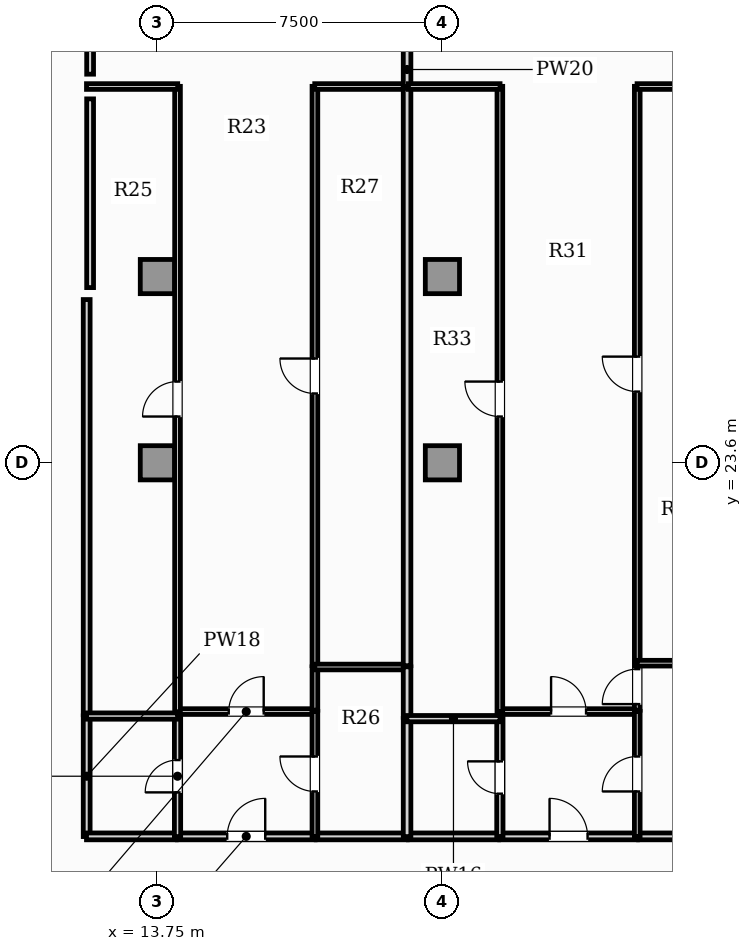
"""IFC4 building model, lengths in metres.
Left out: names, types, materials, properties, quantities, classifications, styles, units other than length and angle.
Written with IfcOpenShell. Run it as: python <this file> out.ifc"""

import sys

from ifc_helpers import new_model, si_unit, direction, frame, frame_2d, origin, origin_2d, place, context, subcontext, project, spatial, rectangle, extrude, element, fill, save


model = new_model("IFC4")
c1 = context("Model", 3, precision=1e-05, world=origin(), true_north=direction((0.0, 1.0)))
c2 = subcontext(c1, "Body", "Model", "MODEL_VIEW")
j1 = project(units=[si_unit("LENGTHUNIT", "METRE"), si_unit("PLANEANGLEUNIT", "RADIAN")], contexts=[c1])
p1 = place(None, origin())
s1 = spatial("IfcSite", under=j1, at=p1, CompositionType="ELEMENT")
p2 = place(p1, origin())
s2 = spatial("IfcBuilding", under=s1, at=p2, CompositionType="ELEMENT")
p3 = place(p2, frame((0.0, 0.0, 92.6)))
s3 = spatial("IfcBuildingStorey", under=s2, at=p3, CompositionType="ELEMENT", Elevation=92.6)
for number, where, z_axis, x_axis in (
    (1, (13.75, 23.6, 0.0), (0.0, 0.0, 1.0), (1.0, 0.0, 0.0)),
    (2, (21.25, 23.6, 0.0), (0.0, 0.0, 1.0), (1.0, 0.0, 0.0)),
    (3, (13.75, 28.5, 0.0), (0.0, 0.0, 1.0), (1.0, 0.0, 0.0)),
    (4, (21.25, 28.5, 0.0), (0.0, 0.0, 1.0), (1.0, 0.0, 0.0)),
):
    element("IfcColumn", number, at=place(p3, frame(where, z_axis=z_axis, x_axis=x_axis)), inside=s3, PredefinedType="COLUMN", context=c2, shape_type="SweptSolid", body=[
        extrude(rectangle(XDim=0.9, YDim=0.9, at=origin_2d()), origin(), (0.0, 0.0, 1.0), 3.85),
    ])
p4 = place(p3, frame((14.275, 13.77, 0.0), z_axis=(0.0, 0.0, 1.0), x_axis=(1.0, 0.0, 0.0)))
e5 = element("IfcWall", 5, at=p4, inside=s3, PredefinedType="PARTITIONING", context=c2, shape_type="SweptSolid", body=[
    extrude(rectangle(XDim=3.625, YDim=0.18, at=frame_2d((1.812, 0.0))), origin(), (0.0, 0.0, 1.0), 3.6),
])
p5 = place(p4, frame((1.312, 0.0, 0.0)))
e6 = element("IfcOpeningElement", 6, at=p5, cuts=e5, PredefinedType="OPENING", context=c2, shape_type="SweptSolid", body=[
    extrude(rectangle(XDim=1.0, YDim=2.15, at=frame_2d((0.5, 1.075))), frame((0.0, 0.1, 0.0), z_axis=(0.0, -1.0, 0.0), x_axis=(1.0, 0.0, 0.0)), (0.0, 0.0, 1.0), 0.2),
])
p6 = place(p3, frame((11.89, 13.765, 0.0), z_axis=(0.0, 0.0, 1.0), x_axis=(0.0, 1.0, 0.0)))
e7 = element("IfcWall", 7, at=p6, inside=s3, PredefinedType="PARTITIONING", context=c2, shape_type="SweptSolid", body=[
    extrude(rectangle(XDim=3.176, YDim=0.18, at=frame_2d((1.588, 0.0))), origin(), (0.0, 0.0, 1.0), 3.6),
])
p7 = place(p3, frame((11.885, 13.77, 0.0), z_axis=(0.0, 0.0, 1.0), x_axis=(1.0, 0.0, 0.0)))
e8 = element("IfcWall", 8, at=p7, inside=s3, PredefinedType="PARTITIONING", context=c2, shape_type="SweptSolid", body=[
    extrude(rectangle(XDim=2.36, YDim=0.18, at=frame_2d((1.18, 0.0))), origin(), (0.0, 0.0, 1.0), 3.6),
])
p8 = place(p3, frame((11.89, 16.971, 0.0), z_axis=(0.0, 0.0, 1.0), x_axis=(0.0, 1.0, 0.0)))
e9 = element("IfcWall", 9, at=p8, inside=s3, PredefinedType="PARTITIONING", context=c2, shape_type="SweptSolid", body=[
    extrude(rectangle(XDim=10.924, YDim=0.18, at=frame_2d((5.462, 0.0))), origin(), (0.0, 0.0, 1.0), 3.6),
])
p9 = place(p3, frame((17.93, 13.77, 0.0), z_axis=(0.0, 0.0, 1.0), x_axis=(1.0, 0.0, 0.0)))
e10 = element("IfcWall", 10, at=p9, inside=s3, PredefinedType="PARTITIONING", context=c2, shape_type="SweptSolid", body=[
    extrude(rectangle(XDim=2.395, YDim=0.18, at=frame_2d((1.197, 0.0))), origin(), (0.0, 0.0, 1.0), 3.6),
])
p10 = place(p3, frame((22.757, 13.77, 0.0), z_axis=(0.0, 0.0, 1.0), x_axis=(1.0, 0.0, 0.0)))
e11 = element("IfcWall", 11, at=p10, inside=s3, PredefinedType="PARTITIONING", context=c2, shape_type="SweptSolid", body=[
    extrude(rectangle(XDim=3.625, YDim=0.18, at=frame_2d((1.812, 0.0))), origin(), (0.0, 0.0, 1.0), 3.6),
])
p11 = place(p10, frame((1.312, 0.0, 0.0)))
e12 = element("IfcOpeningElement", 12, at=p11, cuts=e11, PredefinedType="OPENING", context=c2, shape_type="SweptSolid", body=[
    extrude(rectangle(XDim=1.0, YDim=2.15, at=frame_2d((0.5, 1.075))), frame((0.0, 0.1, 0.0), z_axis=(0.0, -1.0, 0.0), x_axis=(1.0, 0.0, 0.0)), (0.0, 0.0, 1.0), 0.2),
])
p12 = place(p3, frame((20.355, 13.77, 0.0), z_axis=(0.0, 0.0, 1.0), x_axis=(1.0, 0.0, 0.0)))
e13 = element("IfcWall", 13, at=p12, inside=s3, PredefinedType="PARTITIONING", context=c2, shape_type="SweptSolid", body=[
    extrude(rectangle(XDim=2.372, YDim=0.18, at=frame_2d((1.186, 0.0))), origin(), (0.0, 0.0, 1.0), 3.6),
])
p13 = place(p3, frame((26.412, 13.77, 0.0), z_axis=(0.0, 0.0, 1.0), x_axis=(1.0, 0.0, 0.0)))
e14 = element("IfcWall", 14, at=p13, inside=s3, PredefinedType="PARTITIONING", context=c2, shape_type="SweptSolid", body=[
    extrude(rectangle(XDim=2.343, YDim=0.18, at=frame_2d((1.171, 0.0))), origin(), (0.0, 0.0, 1.0), 3.6),
])
p14 = place(p3, frame((14.275, 17.054, 0.0), z_axis=(0.0, 0.0, 1.0), x_axis=(1.0, 0.0, 0.0)))
e15 = element("IfcWall", 15, at=p14, inside=s3, PredefinedType="PARTITIONING", context=c2, shape_type="SweptSolid", body=[
    extrude(rectangle(XDim=3.625, YDim=0.15, at=frame_2d((1.812, 0.0))), origin(), (0.0, 0.0, 1.0), 3.6),
])
p15 = place(p14, frame((1.353, 0.0, 0.0)))
e16 = element("IfcOpeningElement", 16, at=p15, cuts=e15, PredefinedType="OPENING", context=c2, shape_type="SweptSolid", body=[
    extrude(rectangle(XDim=0.92, YDim=2.1, at=frame_2d((0.46, 1.05))), frame((0.0, 0.085, 0.0), z_axis=(0.0, -1.0, 0.0), x_axis=(1.0, 0.0, 0.0)), (0.0, 0.0, 1.0), 0.17),
])
p16 = place(p3, frame((14.28, 13.765, 0.0), z_axis=(0.0, 0.0, 1.0), x_axis=(0.0, 1.0, 0.0)))
e17 = element("IfcWall", 17, at=p16, inside=s3, PredefinedType="PLUMBINGWALL", context=c2, shape_type="SweptSolid", body=[
    extrude(rectangle(XDim=3.176, YDim=0.165, at=frame_2d((1.588, 0.0))), origin(), (0.0, 0.0, 1.0), 3.6),
])
p17 = place(p16, frame((1.163, 0.0, 0.0)))
e18 = element("IfcOpeningElement", 18, at=p17, cuts=e17, PredefinedType="OPENING", context=c2, shape_type="SweptSolid", body=[
    extrude(rectangle(XDim=0.85, YDim=2.1, at=frame_2d((0.425, 1.05))), frame((0.0, 0.093, 0.0), z_axis=(0.0, -1.0, 0.0), x_axis=(1.0, 0.0, 0.0)), (0.0, 0.0, 1.0), 0.185),
])
p18 = place(p3, frame((17.895, 13.765, 0.0), z_axis=(0.0, 0.0, 1.0), x_axis=(0.0, 1.0, 0.0)))
e19 = element("IfcWall", 19, at=p18, inside=s3, PredefinedType="PARTITIONING", context=c2, shape_type="SweptSolid", body=[
    extrude(rectangle(XDim=3.294, YDim=0.15, at=frame_2d((1.647, 0.0))), origin(), (0.0, 0.0, 1.0), 3.6),
])
p19 = place(p18, frame((1.187, 0.0, 0.0)))
e20 = element("IfcOpeningElement", 20, at=p19, cuts=e19, PredefinedType="OPENING", context=c2, shape_type="SweptSolid", body=[
    extrude(rectangle(XDim=0.92, YDim=2.1, at=frame_2d((0.46, 1.05))), frame((0.0, 0.085, 0.0), z_axis=(0.0, -1.0, 0.0), x_axis=(1.0, 0.0, 0.0)), (0.0, 0.0, 1.0), 0.17),
])
p20 = place(p3, frame((14.28, 17.049, 0.0), z_axis=(0.0, 0.0, 1.0), x_axis=(0.0, 1.0, 0.0)))
e21 = element("IfcWall", 21, at=p20, inside=s3, PredefinedType="PARTITIONING", context=c2, shape_type="SweptSolid", body=[
    extrude(rectangle(XDim=16.456, YDim=0.15, at=frame_2d((8.228, 0.0))), origin(), (0.0, 0.0, 1.0), 3.6),
])
p21 = place(p20, frame((7.768, 0.0, 0.0)))
e22 = element("IfcOpeningElement", 22, at=p21, cuts=e21, PredefinedType="OPENING", context=c2, shape_type="SweptSolid", body=[
    extrude(rectangle(XDim=0.92, YDim=2.1, at=frame_2d((0.46, 1.05))), frame((0.0, 0.085, 0.0), z_axis=(0.0, -1.0, 0.0), x_axis=(1.0, 0.0, 0.0)), (0.0, 0.0, 1.0), 0.17),
])
p22 = place(p3, frame((11.885, 33.5, 0.0), z_axis=(0.0, 0.0, 1.0), x_axis=(1.0, 0.0, 0.0)))
e23 = element("IfcWall", 23, at=p22, inside=s3, PredefinedType="PARTITIONING", context=c2, shape_type="SweptSolid", body=[
    extrude(rectangle(XDim=2.4, YDim=0.15, at=frame_2d((1.2, 0.0))), origin(), (0.0, 0.0, 1.0), 3.6),
])
p23 = place(p3, frame((17.895, 17.089, 0.0), z_axis=(0.0, 0.0, 1.0), x_axis=(0.0, 1.0, 0.0)))
e24 = element("IfcWall", 24, at=p23, inside=s3, PredefinedType="PARTITIONING", context=c2, shape_type="SweptSolid", body=[
    extrude(rectangle(XDim=1.143, YDim=0.15, at=frame_2d((0.571, 0.0))), origin(), (0.0, 0.0, 1.0), 3.6),
])
p24 = place(p3, frame((17.895, 18.262, 0.0), z_axis=(0.0, 0.0, 1.0), x_axis=(0.0, 1.0, 0.0)))
e25 = element("IfcWall", 25, at=p24, inside=s3, PredefinedType="PARTITIONING", context=c2, shape_type="SweptSolid", body=[
    extrude(rectangle(XDim=15.243, YDim=0.15, at=frame_2d((7.622, 0.0))), origin(), (0.0, 0.0, 1.0), 3.6),
])
p25 = place(p24, frame((7.162, 0.0, 0.0)))
e26 = element("IfcOpeningElement", 26, at=p25, cuts=e25, PredefinedType="OPENING", context=c2, shape_type="SweptSolid", body=[
    extrude(rectangle(XDim=0.92, YDim=2.1, at=frame_2d((0.46, 1.05))), frame((0.0, 0.085, 0.0), z_axis=(0.0, -1.0, 0.0), x_axis=(1.0, 0.0, 0.0)), (0.0, 0.0, 1.0), 0.17),
])
p26 = place(p3, frame((17.89, 33.5, 0.0), z_axis=(0.0, 0.0, 1.0), x_axis=(1.0, 0.0, 0.0)))
e27 = element("IfcWall", 27, at=p26, inside=s3, PredefinedType="PARTITIONING", context=c2, shape_type="SweptSolid", body=[
    extrude(rectangle(XDim=2.435, YDim=0.15, at=frame_2d((1.217, 0.0))), origin(), (0.0, 0.0, 1.0), 3.6),
])
p27 = place(p3, frame((20.32, 33.495, 0.0), z_axis=(0.0, 0.0, 1.0), x_axis=(0.0, 1.0, 0.0)))
e28 = element("IfcWall", 28, at=p27, inside=s3, PredefinedType="PARTITIONING", context=c2, shape_type="SweptSolid", body=[
    extrude(rectangle(XDim=1.51, YDim=0.2, at=frame_2d((0.755, 0.0))), origin(), (0.0, 0.0, 1.0), 3.6),
])
p28 = place(p3, frame((11.885, 16.936, 0.0), z_axis=(0.0, 0.0, 1.0), x_axis=(1.0, 0.0, 0.0)))
e29 = element("IfcWall", 29, at=p28, inside=s3, PredefinedType="PLUMBINGWALL", context=c2, shape_type="SweptSolid", body=[
    extrude(rectangle(XDim=2.4, YDim=0.165, at=frame_2d((1.2, 0.0))), origin(), (0.0, 0.0, 1.0), 3.6),
])
p29 = place(p3, frame((17.89, 18.227, 0.0), z_axis=(0.0, 0.0, 1.0), x_axis=(1.0, 0.0, 0.0)))
e30 = element("IfcWall", 30, at=p29, inside=s3, PredefinedType="PARTITIONING", context=c2, shape_type="SweptSolid", body=[
    extrude(rectangle(XDim=2.435, YDim=0.15, at=frame_2d((1.217, 0.0))), origin(), (0.0, 0.0, 1.0), 3.6),
])
p30 = place(p3, frame((20.32, 13.765, 0.0), z_axis=(0.0, 0.0, 1.0), x_axis=(0.0, 1.0, 0.0)))
e31 = element("IfcWall", 31, at=p30, inside=s3, PredefinedType="PARTITIONING", context=c2, shape_type="SweptSolid", body=[
    extrude(rectangle(XDim=3.108, YDim=0.2, at=frame_2d((1.554, 0.0))), origin(), (0.0, 0.0, 1.0), 3.6),
])
p31 = place(p3, frame((20.32, 16.903, 0.0), z_axis=(0.0, 0.0, 1.0), x_axis=(0.0, 1.0, 0.0)))
e32 = element("IfcWall", 32, at=p31, inside=s3, PredefinedType="PARTITIONING", context=c2, shape_type="SweptSolid", body=[
    extrude(rectangle(XDim=1.329, YDim=0.2, at=frame_2d((0.664, 0.0))), origin(), (0.0, 0.0, 1.0), 3.6),
])
p32 = place(p3, frame((20.32, 18.262, 0.0), z_axis=(0.0, 0.0, 1.0), x_axis=(0.0, 1.0, 0.0)))
e33 = element("IfcWall", 33, at=p32, inside=s3, PredefinedType="PARTITIONING", context=c2, shape_type="SweptSolid", body=[
    extrude(rectangle(XDim=15.203, YDim=0.2, at=frame_2d((7.602, 0.0))), origin(), (0.0, 0.0, 1.0), 3.6),
])
p33 = place(p3, frame((22.757, 17.054, 0.0), z_axis=(0.0, 0.0, 1.0), x_axis=(1.0, 0.0, 0.0)))
e34 = element("IfcWall", 34, at=p33, inside=s3, PredefinedType="PARTITIONING", context=c2, shape_type="SweptSolid", body=[
    extrude(rectangle(XDim=3.625, YDim=0.15, at=frame_2d((1.812, 0.0))), origin(), (0.0, 0.0, 1.0), 3.6),
])
p34 = place(p33, frame((1.353, 0.0, 0.0)))
e35 = element("IfcOpeningElement", 35, at=p34, cuts=e34, PredefinedType="OPENING", context=c2, shape_type="SweptSolid", body=[
    extrude(rectangle(XDim=0.92, YDim=2.1, at=frame_2d((0.46, 1.05))), frame((0.0, 0.085, 0.0), z_axis=(0.0, -1.0, 0.0), x_axis=(1.0, 0.0, 0.0)), (0.0, 0.0, 1.0), 0.17),
])
p35 = place(p3, frame((22.762, 13.765, 0.0), z_axis=(0.0, 0.0, 1.0), x_axis=(0.0, 1.0, 0.0)))
e36 = element("IfcWall", 36, at=p35, inside=s3, PredefinedType="PLUMBINGWALL", context=c2, shape_type="SweptSolid", body=[
    extrude(rectangle(XDim=3.108, YDim=0.165, at=frame_2d((1.554, 0.0))), origin(), (0.0, 0.0, 1.0), 3.6),
])
p36 = place(p35, frame((1.129, 0.0, 0.0)))
e37 = element("IfcOpeningElement", 37, at=p36, cuts=e36, PredefinedType="OPENING", context=c2, shape_type="SweptSolid", body=[
    extrude(rectangle(XDim=0.85, YDim=2.1, at=frame_2d((0.425, 1.05))), frame((0.0, 0.093, 0.0), z_axis=(0.0, -1.0, 0.0), x_axis=(1.0, 0.0, 0.0)), (0.0, 0.0, 1.0), 0.185),
])
p37 = place(p3, frame((26.377, 13.765, 0.0), z_axis=(0.0, 0.0, 1.0), x_axis=(0.0, 1.0, 0.0)))
e38 = element("IfcWall", 38, at=p37, inside=s3, PredefinedType="PARTITIONING", context=c2, shape_type="SweptSolid", body=[
    extrude(rectangle(XDim=3.294, YDim=0.15, at=frame_2d((1.647, 0.0))), origin(), (0.0, 0.0, 1.0), 3.6),
])
p38 = place(p37, frame((1.187, 0.0, 0.0)))
e39 = element("IfcOpeningElement", 39, at=p38, cuts=e38, PredefinedType="OPENING", context=c2, shape_type="SweptSolid", body=[
    extrude(rectangle(XDim=0.92, YDim=2.1, at=frame_2d((0.46, 1.05))), frame((0.0, 0.085, 0.0), z_axis=(0.0, -1.0, 0.0), x_axis=(1.0, 0.0, 0.0)), (0.0, 0.0, 1.0), 0.17),
])
p39 = place(p3, frame((22.762, 17.049, 0.0), z_axis=(0.0, 0.0, 1.0), x_axis=(0.0, 1.0, 0.0)))
e40 = element("IfcWall", 40, at=p39, inside=s3, PredefinedType="PARTITIONING", context=c2, shape_type="SweptSolid", body=[
    extrude(rectangle(XDim=16.456, YDim=0.15, at=frame_2d((8.228, 0.0))), origin(), (0.0, 0.0, 1.0), 3.6),
])
p40 = place(p39, frame((7.768, 0.0, 0.0)))
e41 = element("IfcOpeningElement", 41, at=p40, cuts=e40, PredefinedType="OPENING", context=c2, shape_type="SweptSolid", body=[
    extrude(rectangle(XDim=0.92, YDim=2.1, at=frame_2d((0.46, 1.05))), frame((0.0, 0.085, 0.0), z_axis=(0.0, -1.0, 0.0), x_axis=(1.0, 0.0, 0.0)), (0.0, 0.0, 1.0), 0.17),
])
p41 = place(p3, frame((20.355, 33.5, 0.0), z_axis=(0.0, 0.0, 1.0), x_axis=(1.0, 0.0, 0.0)))
e42 = element("IfcWall", 42, at=p41, inside=s3, PredefinedType="PARTITIONING", context=c2, shape_type="SweptSolid", body=[
    extrude(rectangle(XDim=2.412, YDim=0.15, at=frame_2d((1.206, 0.0))), origin(), (0.0, 0.0, 1.0), 3.6),
])
p42 = place(p3, frame((26.377, 17.089, 0.0), z_axis=(0.0, 0.0, 1.0), x_axis=(0.0, 1.0, 0.0)))
e43 = element("IfcWall", 43, at=p42, inside=s3, PredefinedType="PARTITIONING", context=c2, shape_type="SweptSolid", body=[
    extrude(rectangle(XDim=1.243, YDim=0.15, at=frame_2d((0.622, 0.0))), origin(), (0.0, 0.0, 1.0), 3.6),
])
p43 = place(p42, frame((0.162, 0.0, 0.0)))
e44 = element("IfcOpeningElement", 44, at=p43, cuts=e43, PredefinedType="OPENING", context=c2, shape_type="SweptSolid", body=[
    extrude(rectangle(XDim=0.92, YDim=2.1, at=frame_2d((0.46, 1.05))), frame((0.0, 0.085, 0.0), z_axis=(0.0, -1.0, 0.0), x_axis=(1.0, 0.0, 0.0)), (0.0, 0.0, 1.0), 0.17),
])
p44 = place(p3, frame((26.377, 18.362, 0.0), z_axis=(0.0, 0.0, 1.0), x_axis=(0.0, 1.0, 0.0)))
e45 = element("IfcWall", 45, at=p44, inside=s3, PredefinedType="PARTITIONING", context=c2, shape_type="SweptSolid", body=[
    extrude(rectangle(XDim=15.143, YDim=0.15, at=frame_2d((7.571, 0.0))), origin(), (0.0, 0.0, 1.0), 3.6),
])
p45 = place(p44, frame((7.111, 0.0, 0.0)))
e46 = element("IfcOpeningElement", 46, at=p45, cuts=e45, PredefinedType="OPENING", context=c2, shape_type="SweptSolid", body=[
    extrude(rectangle(XDim=0.92, YDim=2.1, at=frame_2d((0.46, 1.05))), frame((0.0, 0.085, 0.0), z_axis=(0.0, -1.0, 0.0), x_axis=(1.0, 0.0, 0.0)), (0.0, 0.0, 1.0), 0.17),
])
p46 = place(p3, frame((26.372, 33.5, 0.0), z_axis=(0.0, 0.0, 1.0), x_axis=(1.0, 0.0, 0.0)))
e47 = element("IfcWall", 47, at=p46, inside=s3, PredefinedType="PARTITIONING", context=c2, shape_type="SweptSolid", body=[
    extrude(rectangle(XDim=2.383, YDim=0.15, at=frame_2d((1.191, 0.0))), origin(), (0.0, 0.0, 1.0), 3.6),
])
p47 = place(p3, frame((20.315, 16.868, 0.0), z_axis=(0.0, 0.0, 1.0), x_axis=(1.0, 0.0, 0.0)))
e48 = element("IfcWall", 48, at=p47, inside=s3, PredefinedType="PLUMBINGWALL", context=c2, shape_type="SweptSolid", body=[
    extrude(rectangle(XDim=2.452, YDim=0.165, at=frame_2d((1.226, 0.0))), origin(), (0.0, 0.0, 1.0), 3.6),
])
p48 = place(p3, frame((26.372, 18.327, 0.0), z_axis=(0.0, 0.0, 1.0), x_axis=(1.0, 0.0, 0.0)))
e49 = element("IfcWall", 49, at=p48, inside=s3, PredefinedType="PARTITIONING", context=c2, shape_type="SweptSolid", body=[
    extrude(rectangle(XDim=2.383, YDim=0.15, at=frame_2d((1.191, 0.0))), origin(), (0.0, 0.0, 1.0), 3.6),
])
p49 = place(p3, frame((11.98, 33.825, 0.0), z_axis=(0.0, 0.0, 1.0), x_axis=(0.0, 1.0, 0.0)))
e50 = element("IfcWall", 50, at=p49, inside=s3, PredefinedType="PARTITIONING", context=c2, shape_type="SweptSolid", body=[
    extrude(rectangle(XDim=0.85, YDim=0.18, at=frame_2d((0.425, 0.0))), origin(), (0.0, 0.0, 1.0), 3.6),
])
p50 = place(p3, frame((11.98, 28.21, 0.0), z_axis=(0.0, 0.0, 1.0), x_axis=(0.0, 1.0, 0.0)))
e51 = element("IfcWall", 51, at=p50, inside=s3, PredefinedType="PARTITIONING", context=c2, shape_type="SweptSolid", body=[
    extrude(rectangle(XDim=4.965, YDim=0.18, at=frame_2d((2.482, 0.0))), origin(), (0.0, 0.0, 1.0), 3.6),
])
p51 = place(p5, origin())
e52 = element("IfcDoor", 52, at=p51, inside=s3, OperationType="SINGLE_SWING_RIGHT", PredefinedType="DOOR", context=c2, shape_type="SweptSolid", body=[
    extrude(rectangle(XDim=1.0, YDim=2.15, at=frame_2d((0.5, 1.075))), frame((0.0, 0.025, 0.0), z_axis=(0.0, -1.0, 0.0), x_axis=(1.0, 0.0, 0.0)), (0.0, 0.0, 1.0), 0.05),
])
fill(e6, e52)
p52 = place(p11, origin())
e53 = element("IfcDoor", 53, at=p52, inside=s3, OperationType="SINGLE_SWING_LEFT", PredefinedType="DOOR", context=c2, shape_type="SweptSolid", body=[
    extrude(rectangle(XDim=1.0, YDim=2.15, at=frame_2d((0.5, 1.075))), frame((0.0, 0.025, 0.0), z_axis=(0.0, -1.0, 0.0), x_axis=(1.0, 0.0, 0.0)), (0.0, 0.0, 1.0), 0.05),
])
fill(e12, e53)
p53 = place(p15, origin())
e54 = element("IfcDoor", 54, at=p53, inside=s3, OperationType="SINGLE_SWING_RIGHT", PredefinedType="DOOR", context=c2, shape_type="SweptSolid", body=[
    extrude(rectangle(XDim=0.92, YDim=2.1, at=frame_2d((0.46, 1.05))), frame((0.0, 0.025, 0.0), z_axis=(0.0, -1.0, 0.0), x_axis=(1.0, 0.0, 0.0)), (0.0, 0.0, 1.0), 0.05),
])
fill(e16, e54)
p54 = place(p17, origin())
e55 = element("IfcDoor", 55, at=p54, inside=s3, OperationType="SINGLE_SWING_LEFT", PredefinedType="DOOR", context=c2, shape_type="SweptSolid", body=[
    extrude(rectangle(XDim=0.85, YDim=2.1, at=frame_2d((0.425, 1.05))), frame((0.0, 0.025, 0.0), z_axis=(0.0, -1.0, 0.0), x_axis=(1.0, 0.0, 0.0)), (0.0, 0.0, 1.0), 0.05),
])
fill(e18, e55)
p55 = place(p19, origin())
e56 = element("IfcDoor", 56, at=p55, inside=s3, OperationType="SINGLE_SWING_RIGHT", PredefinedType="DOOR", context=c2, shape_type="SweptSolid", body=[
    extrude(rectangle(XDim=0.92, YDim=2.1, at=frame_2d((0.46, 1.05))), frame((0.0, 0.025, 0.0), z_axis=(0.0, -1.0, 0.0), x_axis=(1.0, 0.0, 0.0)), (0.0, 0.0, 1.0), 0.05),
])
fill(e20, e56)
p56 = place(p21, origin())
e57 = element("IfcDoor", 57, at=p56, inside=s3, OperationType="SINGLE_SWING_LEFT", PredefinedType="DOOR", context=c2, shape_type="SweptSolid", body=[
    extrude(rectangle(XDim=0.92, YDim=2.1, at=frame_2d((0.46, 1.05))), frame((0.0, 0.025, 0.0), z_axis=(0.0, -1.0, 0.0), x_axis=(1.0, 0.0, 0.0)), (0.0, 0.0, 1.0), 0.05),
])
fill(e22, e57)
p57 = place(p25, origin())
e58 = element("IfcDoor", 58, at=p57, inside=s3, OperationType="SINGLE_SWING_RIGHT", PredefinedType="DOOR", context=c2, shape_type="SweptSolid", body=[
    extrude(rectangle(XDim=0.92, YDim=2.1, at=frame_2d((0.46, 1.05))), frame((0.0, 0.025, 0.0), z_axis=(0.0, -1.0, 0.0), x_axis=(1.0, 0.0, 0.0)), (0.0, 0.0, 1.0), 0.05),
])
fill(e26, e58)
p58 = place(p34, origin())
e59 = element("IfcDoor", 59, at=p58, inside=s3, OperationType="SINGLE_SWING_LEFT", PredefinedType="DOOR", context=c2, shape_type="SweptSolid", body=[
    extrude(rectangle(XDim=0.92, YDim=2.1, at=frame_2d((0.46, 1.05))), frame((0.0, 0.025, 0.0), z_axis=(0.0, -1.0, 0.0), x_axis=(1.0, 0.0, 0.0)), (0.0, 0.0, 1.0), 0.05),
])
fill(e35, e59)
p59 = place(p36, origin())
e60 = element("IfcDoor", 60, at=p59, inside=s3, OperationType="SINGLE_SWING_RIGHT", PredefinedType="DOOR", context=c2, shape_type="SweptSolid", body=[
    extrude(rectangle(XDim=0.85, YDim=2.1, at=frame_2d((0.425, 1.05))), frame((0.0, 0.025, 0.0), z_axis=(0.0, -1.0, 0.0), x_axis=(1.0, 0.0, 0.0)), (0.0, 0.0, 1.0), 0.05),
])
fill(e37, e60)
p60 = place(p38, origin())
e61 = element("IfcDoor", 61, at=p60, inside=s3, OperationType="SINGLE_SWING_LEFT", PredefinedType="DOOR", context=c2, shape_type="SweptSolid", body=[
    extrude(rectangle(XDim=0.92, YDim=2.1, at=frame_2d((0.46, 1.05))), frame((0.0, 0.025, 0.0), z_axis=(0.0, -1.0, 0.0), x_axis=(1.0, 0.0, 0.0)), (0.0, 0.0, 1.0), 0.05),
])
fill(e39, e61)
p61 = place(p40, origin())
e62 = element("IfcDoor", 62, at=p61, inside=s3, OperationType="SINGLE_SWING_RIGHT", PredefinedType="DOOR", context=c2, shape_type="SweptSolid", body=[
    extrude(rectangle(XDim=0.92, YDim=2.1, at=frame_2d((0.46, 1.05))), frame((0.0, 0.025, 0.0), z_axis=(0.0, -1.0, 0.0), x_axis=(1.0, 0.0, 0.0)), (0.0, 0.0, 1.0), 0.05),
])
fill(e41, e62)
p62 = place(p43, origin())
e63 = element("IfcDoor", 63, at=p62, inside=s3, OperationType="SINGLE_SWING_LEFT", PredefinedType="DOOR", context=c2, shape_type="SweptSolid", body=[
    extrude(rectangle(XDim=0.92, YDim=2.1, at=frame_2d((0.46, 1.05))), frame((0.0, 0.025, 0.0), z_axis=(0.0, -1.0, 0.0), x_axis=(1.0, 0.0, 0.0)), (0.0, 0.0, 1.0), 0.05),
])
fill(e44, e63)
p63 = place(p45, origin())
e64 = element("IfcDoor", 64, at=p63, inside=s3, OperationType="SINGLE_SWING_RIGHT", PredefinedType="DOOR", context=c2, shape_type="SweptSolid", body=[
    extrude(rectangle(XDim=0.92, YDim=2.1, at=frame_2d((0.46, 1.05))), frame((0.0, 0.025, 0.0), z_axis=(0.0, -1.0, 0.0), x_axis=(1.0, 0.0, 0.0)), (0.0, 0.0, 1.0), 0.05),
])
fill(e46, e64)
save(model, sys.argv[1])
